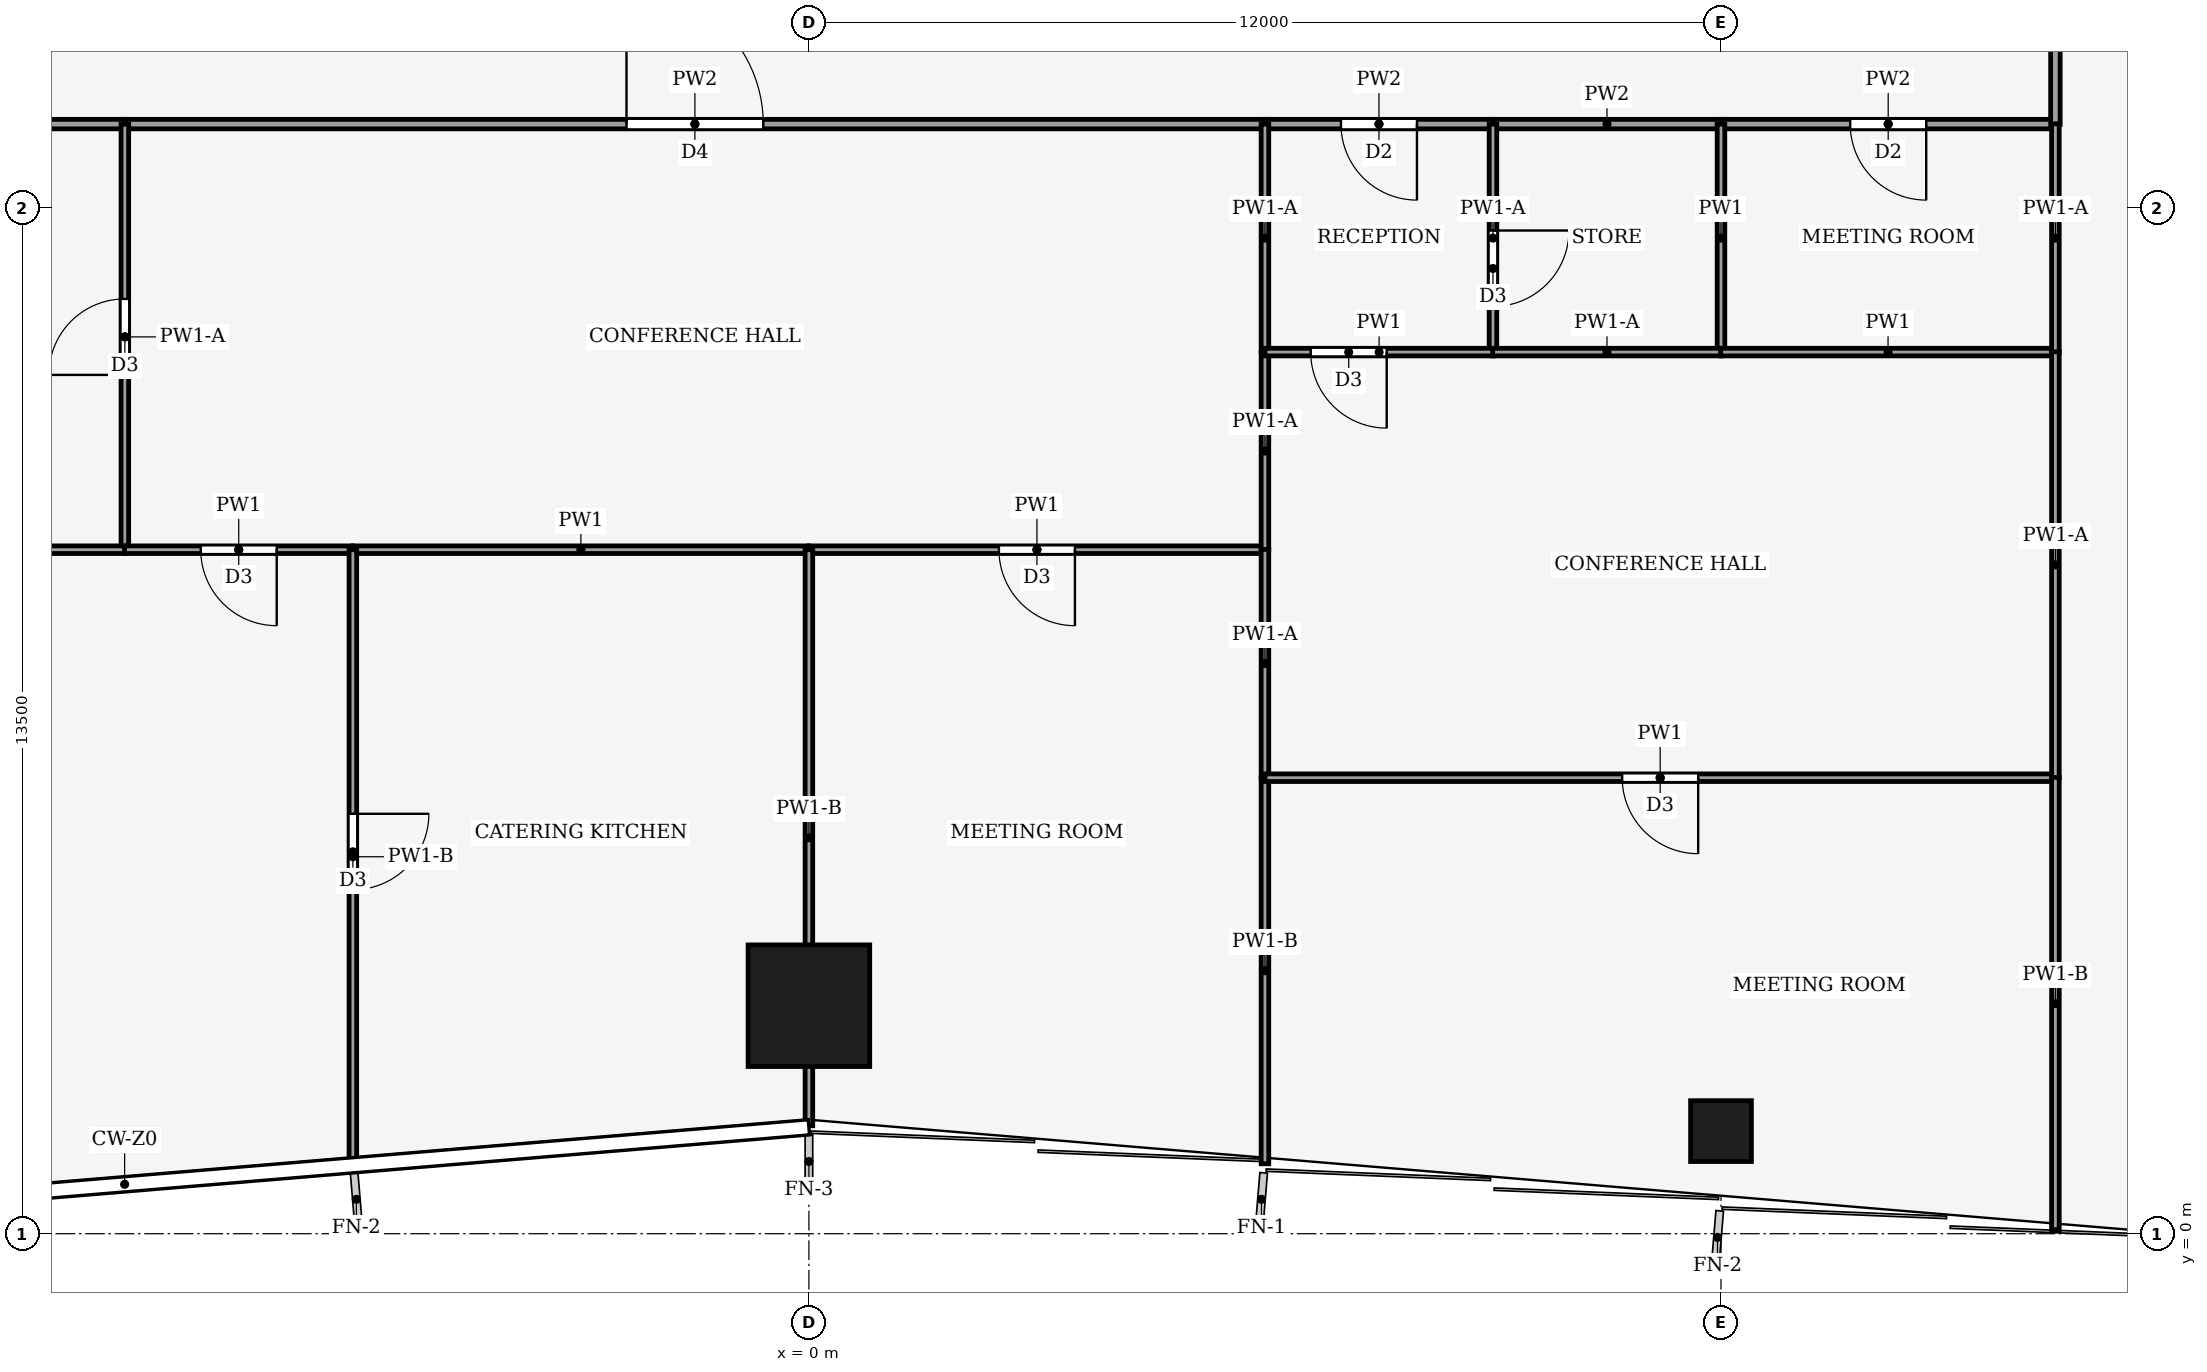
"""IFC4 building model, lengths in metres.
Left out: names, types, materials, properties, quantities, classifications, styles, units other than length and angle.
Written with IfcOpenShell. Run it as: python <this file> out.ifc"""

import sys

from ifc_helpers import new_model, si_unit, direction, frame, frame_2d, origin, origin_2d, place, context, subcontext, project, spatial, rectangle, hollow_rectangle, extrude, element, fill, save


model = new_model("IFC4")
c1 = context("Model", 3, precision=1e-05, world=origin(), true_north=direction((0.0, 1.0)))
c2 = subcontext(c1, "Body", "Model", "MODEL_VIEW")
j1 = project(units=[si_unit("LENGTHUNIT", "METRE"), si_unit("PLANEANGLEUNIT", "RADIAN")], contexts=[c1])
p1 = place(None, origin())
s1 = spatial("IfcSite", under=j1, at=p1, CompositionType="ELEMENT")
p2 = place(p1, origin())
s2 = spatial("IfcBuilding", under=s1, at=p2, CompositionType="ELEMENT")
p3 = place(p2, frame((0.0, 0.0, 9.0)))
s3 = spatial("IfcBuildingStorey", under=s2, at=p3, CompositionType="ELEMENT", Elevation=9.0)
p4 = place(p3, frame((0.0, 3.0, 0.0), z_axis=(0.0, 0.0, 1.0), x_axis=(1.0, 0.0, 0.0)))
e1 = element("IfcColumn", 1, at=p4, inside=s3, PredefinedType="COLUMN", context=c2, shape_type="SweptSolid", body=[
    extrude(hollow_rectangle(XDim=1.6, YDim=1.6, WallThickness=0.09, at=origin_2d()), origin(), (0.0, 0.0, 1.0), 5.0),
])
p5 = place(p3, frame((12.0, 1.35, 0.0), z_axis=(0.0, 0.0, 1.0), x_axis=(1.0, 0.0, 0.0)))
e2 = element("IfcColumn", 2, at=p5, inside=s3, PredefinedType="COLUMN", context=c2, shape_type="SweptSolid", body=[
    extrude(hollow_rectangle(XDim=0.8, YDim=0.8, WallThickness=0.04, at=origin_2d()), origin(), (0.0, 0.0, 1.0), 5.0),
])
p6 = place(p3, frame((-12.0, 14.6, 0.0), z_axis=(0.0, 0.0, 1.0), x_axis=(1.0, 0.0, 0.0)))
e3 = element("IfcWall", 3, at=p6, inside=s3, PredefinedType="PARTITIONING", context=c2, shape_type="SweptSolid", body=[
    extrude(rectangle(XDim=3.0, YDim=0.125, at=frame_2d((1.5, 0.0))), origin(), (0.0, 0.0, 1.0), 4.29),
])
p7 = place(p3, frame((-9.0, 14.6, 0.0), z_axis=(0.0, 0.0, 1.0), x_axis=(1.0, 0.0, 0.0)))
e4 = element("IfcWall", 4, at=p7, inside=s3, PredefinedType="PARTITIONING", context=c2, shape_type="SweptSolid", body=[
    extrude(rectangle(XDim=15.0, YDim=0.125, at=frame_2d((7.5, 0.0))), origin(), (0.0, 0.0, 1.0), 4.29),
])
p8 = place(p7, frame((6.6, 0.0, 0.0)))
e5 = element("IfcOpeningElement", 5, at=p8, cuts=e4, PredefinedType="OPENING", context=c2, shape_type="SweptSolid", body=[
    extrude(rectangle(XDim=1.8, YDim=2.1, at=frame_2d((0.9, 1.05))), frame((0.0, 0.073, 0.0), z_axis=(0.0, -1.0, 0.0), x_axis=(1.0, 0.0, 0.0)), (0.0, 0.0, 1.0), 0.145),
])
p9 = place(p3, frame((9.0, 14.6, 0.0), z_axis=(0.0, 0.0, 1.0), x_axis=(-1.0, 0.0, 0.0)))
e6 = element("IfcWall", 6, at=p9, inside=s3, PredefinedType="PARTITIONING", context=c2, shape_type="SweptSolid", body=[
    extrude(rectangle(XDim=3.0, YDim=0.125, at=frame_2d((1.5, 0.0))), origin(), (0.0, 0.0, 1.0), 4.29),
])
p10 = place(p9, frame((1.0, 0.0, 0.0)))
e7 = element("IfcOpeningElement", 7, at=p10, cuts=e6, PredefinedType="OPENING", context=c2, shape_type="SweptSolid", body=[
    extrude(rectangle(XDim=1.0, YDim=2.1, at=frame_2d((0.5, 1.05))), frame((0.0, 0.073, 0.0), z_axis=(0.0, -1.0, 0.0), x_axis=(1.0, 0.0, 0.0)), (0.0, 0.0, 1.0), 0.145),
])
p11 = place(p3, frame((9.0, 14.6, 0.0), z_axis=(0.0, 0.0, 1.0), x_axis=(1.0, 0.0, 0.0)))
e8 = element("IfcWall", 8, at=p11, inside=s3, PredefinedType="PARTITIONING", context=c2, shape_type="SweptSolid", body=[
    extrude(rectangle(XDim=3.0, YDim=0.125, at=frame_2d((1.5, 0.0))), origin(), (0.0, 0.0, 1.0), 4.29),
])
p12 = place(p3, frame((16.4, 14.6, 0.0), z_axis=(0.0, 0.0, 1.0), x_axis=(-1.0, 0.0, 0.0)))
e9 = element("IfcWall", 9, at=p12, inside=s3, PredefinedType="PARTITIONING", context=c2, shape_type="SweptSolid", body=[
    extrude(rectangle(XDim=4.4, YDim=0.125, at=frame_2d((2.2, 0.0))), origin(), (0.0, 0.0, 1.0), 4.29),
])
p13 = place(p12, frame((1.7, 0.0, 0.0)))
e10 = element("IfcOpeningElement", 10, at=p13, cuts=e9, PredefinedType="OPENING", context=c2, shape_type="SweptSolid", body=[
    extrude(rectangle(XDim=1.0, YDim=2.1, at=frame_2d((0.5, 1.05))), frame((0.0, 0.073, 0.0), z_axis=(0.0, -1.0, 0.0), x_axis=(1.0, 0.0, 0.0)), (0.0, 0.0, 1.0), 0.145),
])
p14 = place(p3, frame((16.4, 18.0, 0.0), z_axis=(0.0, 0.0, 1.0), x_axis=(0.0, -1.0, 0.0)))
e11 = element("IfcWall", 11, at=p14, inside=s3, PredefinedType="PARTITIONING", context=c2, shape_type="SweptSolid", body=[
    extrude(rectangle(XDim=3.404, YDim=0.125, at=frame_2d((1.702, 0.0))), origin(), (0.0, 0.0, 1.0), 4.14),
])
p15 = place(p14, frame((0.802, 0.0, 0.0)))
e12 = element("IfcOpeningElement", 12, at=p15, cuts=e11, PredefinedType="OPENING", context=c2, shape_type="SweptSolid", body=[
    extrude(rectangle(XDim=1.0, YDim=2.1, at=frame_2d((0.5, 1.05))), frame((0.0, 0.073, 0.0), z_axis=(0.0, -1.0, 0.0), x_axis=(1.0, 0.0, 0.0)), (0.0, 0.0, 1.0), 0.145),
])
p16 = place(p3, frame((-9.0, 9.0, 0.0), z_axis=(0.0, 0.0, 1.0), x_axis=(0.0, 1.0, 0.0)))
e13 = element("IfcWall", 13, at=p16, inside=s3, PredefinedType="PARTITIONING", context=c2, shape_type="SweptSolid", body=[
    extrude(rectangle(XDim=5.6, YDim=0.1, at=frame_2d((2.8, 0.0))), origin(), (0.0, 0.0, 1.0), 4.87),
])
p17 = place(p16, frame((2.3, 0.0, 0.0)))
e14 = element("IfcOpeningElement", 14, at=p17, cuts=e13, PredefinedType="OPENING", context=c2, shape_type="SweptSolid", body=[
    extrude(rectangle(XDim=1.0, YDim=2.1, at=frame_2d((0.5, 1.05))), frame((0.0, 0.06, 0.0), z_axis=(0.0, -1.0, 0.0), x_axis=(1.0, 0.0, 0.0)), (0.0, 0.0, 1.0), 0.12),
])
p18 = place(p3, frame((-12.004, 9.0, 0.0), z_axis=(0.0, 0.0, 1.0), x_axis=(1.0, 0.0, 0.0)))
e15 = element("IfcWall", 15, at=p18, inside=s3, PredefinedType="PARTITIONING", context=c2, shape_type="SweptSolid", body=[
    extrude(rectangle(XDim=3.008, YDim=0.1, at=frame_2d((1.504, 0.0))), origin(), (0.0, 0.0, 1.0), 4.87),
])
p19 = place(p3, frame((-6.0, 9.0, 0.0), z_axis=(0.0, 0.0, 1.0), x_axis=(-1.0, 0.0, 0.0)))
e16 = element("IfcWall", 16, at=p19, inside=s3, PredefinedType="PARTITIONING", context=c2, shape_type="SweptSolid", body=[
    extrude(rectangle(XDim=3.004, YDim=0.1, at=frame_2d((1.502, 0.0))), origin(), (0.0, 0.0, 1.0), 4.29),
])
p20 = place(p19, frame((1.002, 0.0, 0.0)))
e17 = element("IfcOpeningElement", 17, at=p20, cuts=e16, PredefinedType="OPENING", context=c2, shape_type="SweptSolid", body=[
    extrude(rectangle(XDim=1.0, YDim=2.1, at=frame_2d((0.5, 1.05))), frame((0.0, 0.06, 0.0), z_axis=(0.0, -1.0, 0.0), x_axis=(1.0, 0.0, 0.0)), (0.0, 0.0, 1.0), 0.12),
])
p21 = place(p3, frame((-6.0, 9.0, 0.0), z_axis=(0.0, 0.0, 1.0), x_axis=(1.0, 0.0, 0.0)))
e18 = element("IfcWall", 18, at=p21, inside=s3, PredefinedType="PARTITIONING", context=c2, shape_type="SweptSolid", body=[
    extrude(rectangle(XDim=6.0, YDim=0.1, at=frame_2d((3.0, 0.0))), origin(), (0.0, 0.0, 1.0), 4.29),
])
p22 = place(p3, frame((6.0, 9.0, 0.0), z_axis=(0.0, 0.0, 1.0), x_axis=(-1.0, 0.0, 0.0)))
e19 = element("IfcWall", 19, at=p22, inside=s3, PredefinedType="PARTITIONING", context=c2, shape_type="SweptSolid", body=[
    extrude(rectangle(XDim=6.0, YDim=0.1, at=frame_2d((3.0, 0.0))), origin(), (0.0, 0.0, 1.0), 4.29),
])
p23 = place(p22, frame((2.5, 0.0, 0.0)))
e20 = element("IfcOpeningElement", 20, at=p23, cuts=e19, PredefinedType="OPENING", context=c2, shape_type="SweptSolid", body=[
    extrude(rectangle(XDim=1.0, YDim=2.1, at=frame_2d((0.5, 1.05))), frame((0.0, 0.06, 0.0), z_axis=(0.0, -1.0, 0.0), x_axis=(1.0, 0.0, 0.0)), (0.0, 0.0, 1.0), 0.12),
])
p24 = place(p3, frame((6.0, 11.6, 0.0), z_axis=(0.0, 0.0, 1.0), x_axis=(0.0, 1.0, 0.0)))
e21 = element("IfcWall", 21, at=p24, inside=s3, PredefinedType="PARTITIONING", context=c2, shape_type="SweptSolid", body=[
    extrude(rectangle(XDim=3.0, YDim=0.1, at=frame_2d((1.5, 0.0))), origin(), (0.0, 0.0, 1.0), 4.87),
])
p25 = place(p3, frame((6.0, 8.996, 0.0), z_axis=(0.0, 0.0, 1.0), x_axis=(0.0, 1.0, 0.0)))
e22 = element("IfcWall", 22, at=p25, inside=s3, PredefinedType="PARTITIONING", context=c2, shape_type="SweptSolid", body=[
    extrude(rectangle(XDim=2.604, YDim=0.1, at=frame_2d((1.302, 0.0))), origin(), (0.0, 0.0, 1.0), 4.87),
])
p26 = place(p3, frame((-6.0, 9.0, 0.0), z_axis=(0.0, 0.0, 1.0), x_axis=(0.0, -1.0, 0.0)))
e23 = element("IfcWall", 23, at=p26, inside=s3, PredefinedType="PARTITIONING", context=c2, shape_type="SweptSolid", body=[
    extrude(rectangle(XDim=8.08, YDim=0.1, at=frame_2d((4.04, 0.0))), origin(), (0.0, 0.0, 1.0), 4.04),
])
p27 = place(p26, frame((3.475, 0.0, 0.0)))
e24 = element("IfcOpeningElement", 24, at=p27, cuts=e23, PredefinedType="OPENING", context=c2, shape_type="SweptSolid", body=[
    extrude(rectangle(XDim=1.0, YDim=2.1, at=frame_2d((0.5, 1.05))), frame((0.0, 0.06, 0.0), z_axis=(0.0, -1.0, 0.0), x_axis=(1.0, 0.0, 0.0)), (0.0, 0.0, 1.0), 0.12),
])
p28 = place(p3, frame((0.0, 1.42, 0.0), z_axis=(0.0, 0.0, 1.0), x_axis=(0.0, 1.0, 0.0)))
e25 = element("IfcWall", 25, at=p28, inside=s3, PredefinedType="PARTITIONING", context=c2, shape_type="SweptSolid", body=[
    extrude(rectangle(XDim=7.58, YDim=0.1, at=frame_2d((3.79, 0.0))), origin(), (0.0, 0.0, 1.0), 4.04),
])
p29 = place(p3, frame((6.0, 6.0, 0.0), z_axis=(0.0, 0.0, 1.0), x_axis=(0.0, 1.0, 0.0)))
e26 = element("IfcWall", 26, at=p29, inside=s3, PredefinedType="PARTITIONING", context=c2, shape_type="SweptSolid", body=[
    extrude(rectangle(XDim=3.004, YDim=0.1, at=frame_2d((1.502, 0.0))), origin(), (0.0, 0.0, 1.0), 4.87),
])
p30 = place(p3, frame((6.0, 0.92, 0.0), z_axis=(0.0, 0.0, 1.0), x_axis=(0.0, 1.0, 0.0)))
e27 = element("IfcWall", 27, at=p30, inside=s3, PredefinedType="PARTITIONING", context=c2, shape_type="SweptSolid", body=[
    extrude(rectangle(XDim=5.08, YDim=0.1, at=frame_2d((2.54, 0.0))), origin(), (0.0, 0.0, 1.0), 4.04),
])
p31 = place(p3, frame((9.0, 14.6, 0.0), z_axis=(0.0, 0.0, 1.0), x_axis=(0.0, -1.0, 0.0)))
e28 = element("IfcWall", 28, at=p31, inside=s3, PredefinedType="PARTITIONING", context=c2, shape_type="SweptSolid", body=[
    extrude(rectangle(XDim=3.0, YDim=0.1, at=frame_2d((1.5, 0.0))), origin(), (0.0, 0.0, 1.0), 4.87),
])
p32 = place(p31, frame((1.4, 0.0, 0.0)))
e29 = element("IfcOpeningElement", 29, at=p32, cuts=e28, PredefinedType="OPENING", context=c2, shape_type="SweptSolid", body=[
    extrude(rectangle(XDim=1.0, YDim=2.1, at=frame_2d((0.5, 1.05))), frame((0.0, 0.06, 0.0), z_axis=(0.0, -1.0, 0.0), x_axis=(1.0, 0.0, 0.0)), (0.0, 0.0, 1.0), 0.12),
])
p33 = place(p3, frame((9.004, 11.6, 0.0), z_axis=(0.0, 0.0, 1.0), x_axis=(-1.0, 0.0, 0.0)))
e30 = element("IfcWall", 30, at=p33, inside=s3, PredefinedType="PARTITIONING", context=c2, shape_type="SweptSolid", body=[
    extrude(rectangle(XDim=3.004, YDim=0.1, at=frame_2d((1.502, 0.0))), origin(), (0.0, 0.0, 1.0), 4.29),
])
p34 = place(p33, frame((1.402, 0.0, 0.0)))
e31 = element("IfcOpeningElement", 31, at=p34, cuts=e30, PredefinedType="OPENING", context=c2, shape_type="SweptSolid", body=[
    extrude(rectangle(XDim=1.0, YDim=2.1, at=frame_2d((0.5, 1.05))), frame((0.0, 0.06, 0.0), z_axis=(0.0, -1.0, 0.0), x_axis=(1.0, 0.0, 0.0)), (0.0, 0.0, 1.0), 0.12),
])
p35 = place(p3, frame((12.0, 11.6, 0.0), z_axis=(0.0, 0.0, 1.0), x_axis=(0.0, 1.0, 0.0)))
e32 = element("IfcWall", 32, at=p35, inside=s3, PredefinedType="PARTITIONING", context=c2, shape_type="SweptSolid", body=[
    extrude(rectangle(XDim=3.0, YDim=0.1, at=frame_2d((1.5, 0.0))), origin(), (0.0, 0.0, 1.0), 4.29),
])
p36 = place(p3, frame((8.996, 11.6, 0.0), z_axis=(0.0, 0.0, 1.0), x_axis=(1.0, 0.0, 0.0)))
e33 = element("IfcWall", 33, at=p36, inside=s3, PredefinedType="PARTITIONING", context=c2, shape_type="SweptSolid", body=[
    extrude(rectangle(XDim=3.008, YDim=0.1, at=frame_2d((1.504, 0.0))), origin(), (0.0, 0.0, 1.0), 4.87),
])
p37 = place(p3, frame((11.996, 11.6, 0.0), z_axis=(0.0, 0.0, 1.0), x_axis=(1.0, 0.0, 0.0)))
e34 = element("IfcWall", 34, at=p37, inside=s3, PredefinedType="PARTITIONING", context=c2, shape_type="SweptSolid", body=[
    extrude(rectangle(XDim=4.404, YDim=0.1, at=frame_2d((2.202, 0.0))), origin(), (0.0, 0.0, 1.0), 4.29),
])
p38 = place(p3, frame((16.4, 11.596, 0.0), z_axis=(0.0, 0.0, 1.0), x_axis=(0.0, 1.0, 0.0)))
e35 = element("IfcWall", 35, at=p38, inside=s3, PredefinedType="PARTITIONING", context=c2, shape_type="SweptSolid", body=[
    extrude(rectangle(XDim=3.008, YDim=0.1, at=frame_2d((1.504, 0.0))), origin(), (0.0, 0.0, 1.0), 4.87),
])
p39 = place(p3, frame((16.4, 6.0, 0.0), z_axis=(0.0, 0.0, 1.0), x_axis=(-1.0, 0.0, 0.0)))
e36 = element("IfcWall", 36, at=p39, inside=s3, PredefinedType="PARTITIONING", context=c2, shape_type="SweptSolid", body=[
    extrude(rectangle(XDim=10.4, YDim=0.1, at=frame_2d((5.2, 0.0))), origin(), (0.0, 0.0, 1.0), 4.29),
])
p40 = place(p39, frame((4.7, 0.0, 0.0)))
e37 = element("IfcOpeningElement", 37, at=p40, cuts=e36, PredefinedType="OPENING", context=c2, shape_type="SweptSolid", body=[
    extrude(rectangle(XDim=1.0, YDim=2.1, at=frame_2d((0.5, 1.05))), frame((0.0, 0.06, 0.0), z_axis=(0.0, -1.0, 0.0), x_axis=(1.0, 0.0, 0.0)), (0.0, 0.0, 1.0), 0.12),
])
p41 = place(p3, frame((16.4, 5.996, 0.0), z_axis=(0.0, 0.0, 1.0), x_axis=(0.0, 1.0, 0.0)))
e38 = element("IfcWall", 38, at=p41, inside=s3, PredefinedType="PARTITIONING", context=c2, shape_type="SweptSolid", body=[
    extrude(rectangle(XDim=5.608, YDim=0.1, at=frame_2d((2.804, 0.0))), origin(), (0.0, 0.0, 1.0), 4.87),
])
p42 = place(p3, frame((16.4, 0.053, 0.0), z_axis=(0.0, 0.0, 1.0), x_axis=(0.0, 1.0, 0.0)))
e39 = element("IfcWall", 39, at=p42, inside=s3, PredefinedType="PARTITIONING", context=c2, shape_type="SweptSolid", body=[
    extrude(rectangle(XDim=5.951, YDim=0.1, at=frame_2d((2.975, 0.0))), origin(), (0.0, 0.0, 1.0), 4.04),
])
p43 = place(p8, origin())
e40 = element("IfcDoor", 40, at=p43, inside=s3, OperationType="DOUBLE_DOOR_SINGLE_SWING", PredefinedType="DOOR", context=c2, shape_type="SweptSolid", body=[
    extrude(rectangle(XDim=1.8, YDim=2.1, at=frame_2d((0.9, 1.05))), frame((0.0, 0.025, 0.0), z_axis=(0.0, -1.0, 0.0), x_axis=(1.0, 0.0, 0.0)), (0.0, 0.0, 1.0), 0.05),
])
fill(e5, e40)
p44 = place(p10, origin())
e41 = element("IfcDoor", 41, at=p44, inside=s3, OperationType="SINGLE_SWING_LEFT", PredefinedType="DOOR", context=c2, shape_type="SweptSolid", body=[
    extrude(rectangle(XDim=1.0, YDim=2.1, at=frame_2d((0.5, 1.05))), frame((0.0, 0.025, 0.0), z_axis=(0.0, -1.0, 0.0), x_axis=(1.0, 0.0, 0.0)), (0.0, 0.0, 1.0), 0.05),
])
fill(e7, e41)
p45 = place(p13, origin())
e42 = element("IfcDoor", 42, at=p45, inside=s3, OperationType="SINGLE_SWING_RIGHT", PredefinedType="DOOR", context=c2, shape_type="SweptSolid", body=[
    extrude(rectangle(XDim=1.0, YDim=2.1, at=frame_2d((0.5, 1.05))), frame((0.0, 0.025, 0.0), z_axis=(0.0, -1.0, 0.0), x_axis=(1.0, 0.0, 0.0)), (0.0, 0.0, 1.0), 0.05),
])
fill(e10, e42)
p46 = place(p17, origin())
e43 = element("IfcDoor", 43, at=p46, inside=s3, OperationType="SINGLE_SWING_RIGHT", PredefinedType="DOOR", context=c2, shape_type="SweptSolid", body=[
    extrude(rectangle(XDim=1.0, YDim=2.1, at=frame_2d((0.5, 1.05))), frame((0.0, 0.025, 0.0), z_axis=(0.0, -1.0, 0.0), x_axis=(1.0, 0.0, 0.0)), (0.0, 0.0, 1.0), 0.05),
])
fill(e14, e43)
p47 = place(p20, origin())
e44 = element("IfcDoor", 44, at=p47, inside=s3, OperationType="SINGLE_SWING_LEFT", PredefinedType="DOOR", context=c2, shape_type="SweptSolid", body=[
    extrude(rectangle(XDim=1.0, YDim=2.1, at=frame_2d((0.5, 1.05))), frame((0.0, 0.025, 0.0), z_axis=(0.0, -1.0, 0.0), x_axis=(1.0, 0.0, 0.0)), (0.0, 0.0, 1.0), 0.05),
])
fill(e17, e44)
p48 = place(p23, origin())
e45 = element("IfcDoor", 45, at=p48, inside=s3, OperationType="SINGLE_SWING_RIGHT", PredefinedType="DOOR", context=c2, shape_type="SweptSolid", body=[
    extrude(rectangle(XDim=1.0, YDim=2.1, at=frame_2d((0.5, 1.05))), frame((0.0, 0.025, 0.0), z_axis=(0.0, -1.0, 0.0), x_axis=(1.0, 0.0, 0.0)), (0.0, 0.0, 1.0), 0.05),
])
fill(e20, e45)
p49 = place(p27, origin())
e46 = element("IfcDoor", 46, at=p49, inside=s3, OperationType="SINGLE_SWING_LEFT", PredefinedType="DOOR", context=c2, shape_type="SweptSolid", body=[
    extrude(rectangle(XDim=1.0, YDim=2.1, at=frame_2d((0.5, 1.05))), frame((0.0, 0.025, 0.0), z_axis=(0.0, -1.0, 0.0), x_axis=(1.0, 0.0, 0.0)), (0.0, 0.0, 1.0), 0.05),
])
fill(e24, e46)
p50 = place(p32, origin())
e47 = element("IfcDoor", 47, at=p50, inside=s3, OperationType="SINGLE_SWING_RIGHT", PredefinedType="DOOR", context=c2, shape_type="SweptSolid", body=[
    extrude(rectangle(XDim=1.0, YDim=2.1, at=frame_2d((0.5, 1.05))), frame((0.0, 0.025, 0.0), z_axis=(0.0, -1.0, 0.0), x_axis=(1.0, 0.0, 0.0)), (0.0, 0.0, 1.0), 0.05),
])
fill(e29, e47)
p51 = place(p34, origin())
e48 = element("IfcDoor", 48, at=p51, inside=s3, OperationType="SINGLE_SWING_RIGHT", PredefinedType="DOOR", context=c2, shape_type="SweptSolid", body=[
    extrude(rectangle(XDim=1.0, YDim=2.1, at=frame_2d((0.5, 1.05))), frame((0.0, 0.025, 0.0), z_axis=(0.0, -1.0, 0.0), x_axis=(1.0, 0.0, 0.0)), (0.0, 0.0, 1.0), 0.05),
])
fill(e31, e48)
p52 = place(p40, origin())
e49 = element("IfcDoor", 49, at=p52, inside=s3, OperationType="SINGLE_SWING_LEFT", PredefinedType="DOOR", context=c2, shape_type="SweptSolid", body=[
    extrude(rectangle(XDim=1.0, YDim=2.1, at=frame_2d((0.5, 1.05))), frame((0.0, 0.025, 0.0), z_axis=(0.0, -1.0, 0.0), x_axis=(1.0, 0.0, 0.0)), (0.0, 0.0, 1.0), 0.05),
])
fill(e37, e49)
save(model, sys.argv[1])
